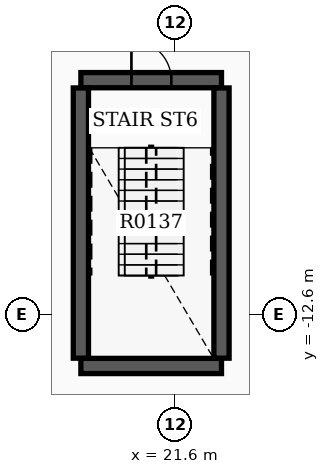
"""IFC4 building model, lengths in metres.
Left out: names, types, materials, properties, quantities, classifications, styles, units other than length and angle.
Written with IfcOpenShell. Run it as: python <this file> out.ifc"""

import sys

from ifc_helpers import new_model, si_unit, direction, frame, frame_2d, origin, place, context, subcontext, project, spatial, rectangle, extrude, element, fill, save


model = new_model("IFC4")
c1 = context("Model", 3, precision=1e-05, world=origin(), true_north=direction((0.0, 1.0)))
c2 = subcontext(c1, "Body", "Model", "MODEL_VIEW")
j1 = project(units=[si_unit("LENGTHUNIT", "METRE"), si_unit("PLANEANGLEUNIT", "RADIAN")], contexts=[c1])
p1 = place(None, origin())
s1 = spatial("IfcSite", under=j1, at=p1, CompositionType="ELEMENT")
p2 = place(p1, origin())
s2 = spatial("IfcBuilding", under=s1, at=p2, CompositionType="ELEMENT")
p3 = place(p2, frame((0.0, 0.0, 5.4)))
s3 = spatial("IfcBuildingStorey", under=s2, at=p3, CompositionType="ELEMENT", Elevation=5.4)
p4 = place(p3, frame((19.12, -6.43, 0.0), z_axis=(0.0, 0.0, 1.0), x_axis=(1.0, 0.0, 0.0)))
e1 = element("IfcWall", 1, at=p4, inside=s3, PredefinedType="SHEAR", context=c2, shape_type="SweptSolid", body=[
    extrude(rectangle(XDim=3.7, YDim=0.4, at=frame_2d((1.85, 0.0))), origin(), (0.0, 0.0, 1.0), 4.55),
])
p5 = place(p4, frame((1.33, 0.0, 0.0)))
e2 = element("IfcOpeningElement", 2, at=p5, cuts=e1, PredefinedType="OPENING", context=c2, shape_type="SweptSolid", body=[
    extrude(rectangle(XDim=1.05, YDim=2.15, at=frame_2d((0.525, 1.075))), frame((0.0, 0.21, 0.0), z_axis=(0.0, -1.0, 0.0), x_axis=(1.0, 0.0, 0.0)), (0.0, 0.0, 1.0), 0.42),
])
p6 = place(p3, frame((19.12, -13.95, 0.0), z_axis=(0.0, 0.0, 1.0), x_axis=(1.0, 0.0, 0.0)))
e3 = element("IfcWall", 3, at=p6, inside=s3, PredefinedType="SHEAR", context=c2, shape_type="SweptSolid", body=[
    extrude(rectangle(XDim=3.7, YDim=0.4, at=frame_2d((1.85, 0.0))), origin(), (0.0, 0.0, 1.0), 4.55),
])
for number, where, z_axis, x_axis in (
    (4, (19.12, -13.745, 0.0), (0.0, 0.0, 1.0), (0.0, 1.0, 0.0)),
    (5, (22.82, -13.745, 0.0), (0.0, 0.0, 1.0), (0.0, 1.0, 0.0)),
):
    element("IfcWall", number, at=place(p3, frame(where, z_axis=z_axis, x_axis=x_axis)), inside=s3, PredefinedType="SHEAR", context=c2, shape_type="SweptSolid", body=[
        extrude(rectangle(XDim=7.11, YDim=0.4, at=frame_2d((3.555, 0.0))), origin(), (0.0, 0.0, 1.0), 4.55),
    ])
p7 = place(p5, origin())
e6 = element("IfcDoor", 6, at=p7, inside=s3, OperationType="SINGLE_SWING_LEFT", PredefinedType="DOOR", context=c2, shape_type="SweptSolid", body=[
    extrude(rectangle(XDim=1.05, YDim=2.15, at=frame_2d((0.525, 1.075))), frame((0.0, 0.025, 0.0), z_axis=(0.0, -1.0, 0.0), x_axis=(1.0, 0.0, 0.0)), (0.0, 0.0, 1.0), 0.05),
])
fill(e2, e6)
save(model, sys.argv[1])
